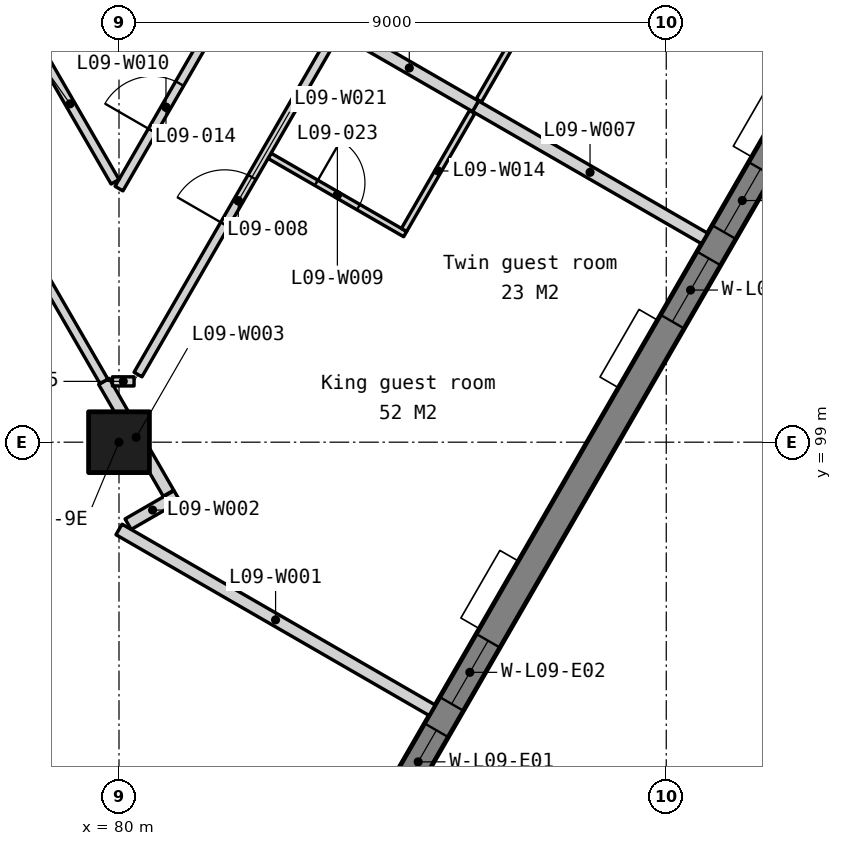
"""IFC4 building model, lengths in metres.
Left out: names, types, materials, properties, quantities, classifications, styles, units other than length and angle.
Written with IfcOpenShell. Run it as: python <this file> out.ifc"""

import sys

from ifc_helpers import new_model, si_unit, direction, frame, frame_2d, origin, origin_2d, place, context, subcontext, project, spatial, polyline, rectangle, outline, extrude, element, fill, save


model = new_model("IFC4")
c1 = context("Model", 3, precision=1e-05, world=origin(), true_north=direction((0.0, 1.0)))
c2 = subcontext(c1, "Body", "Model", "MODEL_VIEW")
j1 = project(units=[si_unit("LENGTHUNIT", "METRE"), si_unit("PLANEANGLEUNIT", "RADIAN")], contexts=[c1])
p1 = place(None, origin())
s1 = spatial("IfcSite", under=j1, at=p1, CompositionType="ELEMENT")
p2 = place(p1, origin())
s2 = spatial("IfcBuilding", under=s1, at=p2, CompositionType="ELEMENT")
p3 = place(p2, frame((0.0, 0.0, 45.5)))
s3 = spatial("IfcBuildingStorey", under=s2, at=p3, CompositionType="ELEMENT", Elevation=45.5)
p4 = place(p3, frame((80.0, 99.0, 0.0), z_axis=(0.0, 0.0, 1.0), x_axis=(1.0, 0.0, 0.0)))
e1 = element("IfcColumn", 1, at=p4, inside=s3, PredefinedType="COLUMN", context=c2, shape_type="SweptSolid", body=[
    extrude(rectangle(XDim=1.0, YDim=1.0, at=origin_2d()), origin(), (0.0, 0.0, 1.0), 3.5),
])
p5 = place(p3, frame((83.105, 90.599, -0.15), z_axis=(0.0, 0.0, 1.0), x_axis=(0.499999201451, 0.866025864826, 0.0)))
e2 = element("IfcWall", 2, at=p5, inside=s3, PredefinedType="SOLIDWALL", context=c2, shape_type="SweptSolid", body=[
    extrude(outline(polyline([(44.8, 0.0), (44.8, 3.5), (0.0, 3.5), (0.0, 0.0), (44.8, 0.0)])), frame((0.0, 0.225, 0.0), z_axis=(0.0, -1.0, 0.0), x_axis=(1.0, 0.0, 0.0)), (0.0, 0.0, 1.0), 0.45),
])
p6 = place(p5, frame((3.03, 0.0, 1.05)))
e3 = element("IfcOpeningElement", 3, at=p6, cuts=e2, PredefinedType="OPENING", context=c2, shape_type="SweptSolid", body=[
    extrude(rectangle(XDim=1.2, YDim=1.5, at=frame_2d((0.6, 0.75))), frame((0.0, 0.235, 0.0), z_axis=(0.0, -1.0, 0.0), x_axis=(1.0, 0.0, 0.0)), (0.0, 0.0, 1.0), 0.47),
])
p7 = place(p5, frame((4.73, 0.0, 1.05)))
e4 = element("IfcOpeningElement", 4, at=p7, cuts=e2, PredefinedType="OPENING", context=c2, shape_type="SweptSolid", body=[
    extrude(rectangle(XDim=1.2, YDim=1.5, at=frame_2d((0.6, 0.75))), frame((0.0, 0.235, 0.0), z_axis=(0.0, -1.0, 0.0), x_axis=(1.0, 0.0, 0.0)), (0.0, 0.0, 1.0), 0.47),
])
p8 = place(p5, frame((11.99, 0.0, 1.05)))
e5 = element("IfcOpeningElement", 5, at=p8, cuts=e2, PredefinedType="OPENING", context=c2, shape_type="SweptSolid", body=[
    extrude(rectangle(XDim=1.2, YDim=1.5, at=frame_2d((0.6, 0.75))), frame((0.0, 0.235, 0.0), z_axis=(0.0, -1.0, 0.0), x_axis=(1.0, 0.0, 0.0)), (0.0, 0.0, 1.0), 0.47),
])
p9 = place(p5, frame((13.69, 0.0, 1.05)))
e6 = element("IfcOpeningElement", 6, at=p9, cuts=e2, PredefinedType="OPENING", context=c2, shape_type="SweptSolid", body=[
    extrude(rectangle(XDim=1.2, YDim=1.5, at=frame_2d((0.6, 0.75))), frame((0.0, 0.235, 0.0), z_axis=(0.0, -1.0, 0.0), x_axis=(1.0, 0.0, 0.0)), (0.0, 0.0, 1.0), 0.47),
])
p10 = place(p5, frame((20.95, 0.0, 1.05)))
e7 = element("IfcOpeningElement", 7, at=p10, cuts=e2, PredefinedType="OPENING", context=c2, shape_type="SweptSolid", body=[
    extrude(rectangle(XDim=1.2, YDim=1.5, at=frame_2d((0.6, 0.75))), frame((0.0, 0.235, 0.0), z_axis=(0.0, -1.0, 0.0), x_axis=(1.0, 0.0, 0.0)), (0.0, 0.0, 1.0), 0.47),
])
p11 = place(p5, frame((22.65, 0.0, 1.05)))
e8 = element("IfcOpeningElement", 8, at=p11, cuts=e2, PredefinedType="OPENING", context=c2, shape_type="SweptSolid", body=[
    extrude(rectangle(XDim=1.2, YDim=1.5, at=frame_2d((0.6, 0.75))), frame((0.0, 0.235, 0.0), z_axis=(0.0, -1.0, 0.0), x_axis=(1.0, 0.0, 0.0)), (0.0, 0.0, 1.0), 0.47),
])
p12 = place(p5, frame((29.91, 0.0, 1.05)))
e9 = element("IfcOpeningElement", 9, at=p12, cuts=e2, PredefinedType="OPENING", context=c2, shape_type="SweptSolid", body=[
    extrude(rectangle(XDim=1.2, YDim=1.5, at=frame_2d((0.6, 0.75))), frame((0.0, 0.235, 0.0), z_axis=(0.0, -1.0, 0.0), x_axis=(1.0, 0.0, 0.0)), (0.0, 0.0, 1.0), 0.47),
])
p13 = place(p5, frame((31.61, 0.0, 1.05)))
e10 = element("IfcOpeningElement", 10, at=p13, cuts=e2, PredefinedType="OPENING", context=c2, shape_type="SweptSolid", body=[
    extrude(rectangle(XDim=1.2, YDim=1.5, at=frame_2d((0.6, 0.75))), frame((0.0, 0.235, 0.0), z_axis=(0.0, -1.0, 0.0), x_axis=(1.0, 0.0, 0.0)), (0.0, 0.0, 1.0), 0.47),
])
p14 = place(p5, frame((38.87, 0.0, 1.05)))
e11 = element("IfcOpeningElement", 11, at=p14, cuts=e2, PredefinedType="OPENING", context=c2, shape_type="SweptSolid", body=[
    extrude(rectangle(XDim=1.2, YDim=1.5, at=frame_2d((0.6, 0.75))), frame((0.0, 0.235, 0.0), z_axis=(0.0, -1.0, 0.0), x_axis=(1.0, 0.0, 0.0)), (0.0, 0.0, 1.0), 0.47),
])
p15 = place(p5, frame((40.57, 0.0, 1.05)))
e12 = element("IfcOpeningElement", 12, at=p15, cuts=e2, PredefinedType="OPENING", context=c2, shape_type="SweptSolid", body=[
    extrude(rectangle(XDim=1.2, YDim=1.5, at=frame_2d((0.6, 0.75))), frame((0.0, 0.235, 0.0), z_axis=(0.0, -1.0, 0.0), x_axis=(1.0, 0.0, 0.0)), (0.0, 0.0, 1.0), 0.47),
])
p16 = place(p3, frame((80.0, 97.565, 0.0), z_axis=(0.0, 0.0, 1.0), x_axis=(0.866021515814, -0.500006734102, 0.0)))
e13 = element("IfcWall", 13, at=p16, inside=s3, PredefinedType="PARTITIONING", context=c2, shape_type="SweptSolid", body=[
    extrude(rectangle(XDim=5.947, YDim=0.2, at=frame_2d((2.974, 0.0))), origin(), (0.0, 0.0, 1.0), 3.35),
])
p17 = place(p3, frame((80.15, 97.651, 0.0), z_axis=(0.0, 0.0, 1.0), x_axis=(0.866084982889, 0.499896791762, 0.0)))
e14 = element("IfcWall", 14, at=p17, inside=s3, PredefinedType="PARTITIONING", context=c2, shape_type="SweptSolid", body=[
    extrude(rectangle(XDim=0.929, YDim=0.2, at=frame_2d((0.465, 0.0))), origin(), (0.0, 0.0, 1.0), 3.35),
])
p18 = place(p3, frame((79.752, 100.0, 0.0), z_axis=(0.0, 0.0, 1.0), x_axis=(0.499861813449, -0.866105171129, 0.0)))
e15 = element("IfcWall", 15, at=p18, inside=s3, PredefinedType="PARTITIONING", context=c2, shape_type="SweptSolid", body=[
    extrude(rectangle(XDim=2.123, YDim=0.2, at=frame_2d((1.062, 0.0))), origin(), (0.0, 0.0, 1.0), 3.35),
])
p19 = place(p3, frame((76.389, 105.826, 0.0), z_axis=(0.0, 0.0, 1.0), x_axis=(0.499980071345, -0.866036909293, 0.0)))
e16 = element("IfcWall", 16, at=p19, inside=s3, PredefinedType="PARTITIONING", context=c2, shape_type="SweptSolid", body=[
    extrude(rectangle(XDim=6.727, YDim=0.15, at=frame_2d((3.363, 0.0))), origin(), (0.0, 0.0, 1.0), 3.35),
])
p20 = place(p19, frame((2.914, 0.0, 0.0)))
e17 = element("IfcOpeningElement", 17, at=p20, cuts=e16, PredefinedType="OPENING", context=c2, shape_type="SweptSolid", body=[
    extrude(rectangle(XDim=0.9, YDim=2.1, at=frame_2d((0.45, 1.05))), frame((0.0, 0.085, 0.0), z_axis=(0.0, -1.0, 0.0), x_axis=(1.0, 0.0, 0.0)), (0.0, 0.0, 1.0), 0.17),
])
p21 = place(p3, frame((79.892, 100.0, 0.0), z_axis=(0.0, 0.0, 1.0), x_axis=(1.0, 0.0, 0.0)))
e18 = element("IfcWall", 18, at=p21, inside=s3, PredefinedType="PARTITIONING", context=c2, shape_type="SweptSolid", body=[
    extrude(rectangle(XDim=0.355, YDim=0.15, at=frame_2d((0.178, 0.0))), origin(), (0.0, 0.0, 1.0), 3.35),
])
p22 = place(p3, frame((85.863, 104.526, 0.0), z_axis=(0.0, 0.0, 1.0), x_axis=(0.866027639635, -0.499996127374, 0.0)))
e19 = element("IfcWall", 19, at=p22, inside=s3, PredefinedType="PARTITIONING", context=c2, shape_type="SweptSolid", body=[
    extrude(rectangle(XDim=4.35, YDim=0.2, at=frame_2d((2.175, 0.0))), origin(), (0.0, 0.0, 1.0), 3.35),
])
p23 = place(p3, frame((82.476, 103.71, 0.0), z_axis=(0.0, 0.0, 1.0), x_axis=(0.866005588531, -0.500034319456, 0.0)))
e20 = element("IfcWall", 20, at=p23, inside=s3, PredefinedType="PARTITIONING", context=c2, shape_type="SweptSolid", body=[
    extrude(rectangle(XDim=2.575, YDim=0.1, at=frame_2d((1.288, 0.0))), origin(), (0.0, 0.0, 1.0), 3.35),
])
p24 = place(p23, frame((0.887, 0.0, 0.0)))
e21 = element("IfcOpeningElement", 21, at=p24, cuts=e20, PredefinedType="OPENING", context=c2, shape_type="SweptSolid", body=[
    extrude(rectangle(XDim=0.8, YDim=2.1, at=frame_2d((0.4, 1.05))), frame((0.0, 0.06, 0.0), z_axis=(0.0, -1.0, 0.0), x_axis=(1.0, 0.0, 0.0)), (0.0, 0.0, 1.0), 0.12),
])
p25 = place(p3, frame((80.0, 103.17, 0.0), z_axis=(0.0, 0.0, 1.0), x_axis=(0.499980071345, 0.866036909293, 0.0)))
e22 = element("IfcWall", 22, at=p25, inside=s3, PredefinedType="PARTITIONING", context=c2, shape_type="SweptSolid", body=[
    extrude(rectangle(XDim=3.09, YDim=0.15, at=frame_2d((1.545, 0.0))), origin(), (0.0, 0.0, 1.0), 3.35),
])
p26 = place(p25, frame((1.095, 0.0, 0.0)))
e23 = element("IfcOpeningElement", 23, at=p26, cuts=e22, PredefinedType="OPENING", context=c2, shape_type="SweptSolid", body=[
    extrude(rectangle(XDim=0.9, YDim=2.1, at=frame_2d((0.45, 1.05))), frame((0.0, 0.085, 0.0), z_axis=(0.0, -1.0, 0.0), x_axis=(1.0, 0.0, 0.0)), (0.0, 0.0, 1.0), 0.17),
])
p27 = place(p3, frame((84.688, 102.49, 0.0), z_axis=(0.0, 0.0, 1.0), x_axis=(0.500030632641, 0.866007717299, 0.0)))
e24 = element("IfcWall", 24, at=p27, inside=s3, PredefinedType="PARTITIONING", context=c2, shape_type="SweptSolid", body=[
    extrude(rectangle(XDim=2.24, YDim=0.1, at=frame_2d((1.12, 0.0))), origin(), (0.0, 0.0, 1.0), 3.35),
])
p28 = place(p3, frame((83.685, 105.783, 0.0), z_axis=(0.0, 0.0, 1.0), x_axis=(0.866006140796, -0.500033362991, 0.0)))
e25 = element("IfcWall", 25, at=p28, inside=s3, PredefinedType="PARTITIONING", context=c2, shape_type="SweptSolid", body=[
    extrude(rectangle(XDim=2.515, YDim=0.2, at=frame_2d((1.257, 0.0))), origin(), (0.0, 0.0, 1.0), 3.35),
])
p29 = place(p3, frame((80.313, 100.113, 0.0), z_axis=(0.0, 0.0, 1.0), x_axis=(0.500011833666, 0.866018571506, 0.0)))
e26 = element("IfcWall", 26, at=p29, inside=s3, PredefinedType="PARTITIONING", context=c2, shape_type="SweptSolid", body=[
    extrude(rectangle(XDim=6.597, YDim=0.15, at=frame_2d((3.298, 0.0))), origin(), (0.0, 0.0, 1.0), 3.35),
])
p30 = place(p29, frame((2.849, 0.0, 0.0)))
e27 = element("IfcOpeningElement", 27, at=p30, cuts=e26, PredefinedType="OPENING", context=c2, shape_type="SweptSolid", body=[
    extrude(rectangle(XDim=0.9, YDim=2.1, at=frame_2d((0.45, 1.05))), frame((0.0, 0.085, 0.0), z_axis=(0.0, -1.0, 0.0), x_axis=(1.0, 0.0, 0.0)), (0.0, 0.0, 1.0), 0.17),
])
p31 = place(p3, frame((78.455, 105.846, 0.0), z_axis=(0.0, 0.0, 1.0), x_axis=(0.499988999718, -0.866031754707, 0.0)))
e28 = element("IfcWall", 28, at=p31, inside=s3, PredefinedType="PARTITIONING", context=c2, shape_type="SweptSolid", body=[
    extrude(rectangle(XDim=2.96, YDim=0.15, at=frame_2d((1.48, 0.0))), origin(), (0.0, 0.0, 1.0), 3.35),
])
p32 = place(p3, frame((85.918, 104.621, 0.0), z_axis=(0.0, 0.0, 1.0), x_axis=(0.500032503492, 0.866006637072, 0.0)))
e29 = element("IfcWall", 29, at=p32, inside=s3, PredefinedType="PARTITIONING", context=c2, shape_type="SweptSolid", body=[
    extrude(rectangle(XDim=2.34, YDim=0.1, at=frame_2d((1.17, 0.0))), origin(), (0.0, 0.0, 1.0), 3.35),
])
p33 = place(p6, origin())
e30 = element("IfcWindow", 30, at=p33, inside=s3, PartitioningType="SINGLE_PANEL", PredefinedType="WINDOW", context=c2, shape_type="SweptSolid", body=[
    extrude(rectangle(XDim=1.2, YDim=1.5, at=frame_2d((0.6, 0.75))), frame((0.0, 0.03, 0.0), z_axis=(0.0, -1.0, 0.0), x_axis=(1.0, 0.0, 0.0)), (0.0, 0.0, 1.0), 0.06),
])
fill(e3, e30)
p34 = place(p7, origin())
e31 = element("IfcWindow", 31, at=p34, inside=s3, PartitioningType="SINGLE_PANEL", PredefinedType="WINDOW", context=c2, shape_type="SweptSolid", body=[
    extrude(rectangle(XDim=1.2, YDim=1.5, at=frame_2d((0.6, 0.75))), frame((0.0, 0.03, 0.0), z_axis=(0.0, -1.0, 0.0), x_axis=(1.0, 0.0, 0.0)), (0.0, 0.0, 1.0), 0.06),
])
fill(e4, e31)
p35 = place(p8, origin())
e32 = element("IfcWindow", 32, at=p35, inside=s3, PartitioningType="SINGLE_PANEL", PredefinedType="WINDOW", context=c2, shape_type="SweptSolid", body=[
    extrude(rectangle(XDim=1.2, YDim=1.5, at=frame_2d((0.6, 0.75))), frame((0.0, 0.03, 0.0), z_axis=(0.0, -1.0, 0.0), x_axis=(1.0, 0.0, 0.0)), (0.0, 0.0, 1.0), 0.06),
])
fill(e5, e32)
p36 = place(p9, origin())
e33 = element("IfcWindow", 33, at=p36, inside=s3, PartitioningType="SINGLE_PANEL", PredefinedType="WINDOW", context=c2, shape_type="SweptSolid", body=[
    extrude(rectangle(XDim=1.2, YDim=1.5, at=frame_2d((0.6, 0.75))), frame((0.0, 0.03, 0.0), z_axis=(0.0, -1.0, 0.0), x_axis=(1.0, 0.0, 0.0)), (0.0, 0.0, 1.0), 0.06),
])
fill(e6, e33)
p37 = place(p30, origin())
e34 = element("IfcDoor", 34, at=p37, inside=s3, OperationType="SINGLE_SWING_LEFT", PredefinedType="DOOR", context=c2, shape_type="SweptSolid", body=[
    extrude(rectangle(XDim=0.9, YDim=2.1, at=frame_2d((0.45, 1.05))), frame((0.0, 0.025, 0.0), z_axis=(0.0, -1.0, 0.0), x_axis=(1.0, 0.0, 0.0)), (0.0, 0.0, 1.0), 0.05),
])
fill(e27, e34)
p38 = place(p26, origin())
e35 = element("IfcDoor", 35, at=p38, inside=s3, OperationType="SINGLE_SWING_LEFT", PredefinedType="DOOR", context=c2, shape_type="SweptSolid", body=[
    extrude(rectangle(XDim=0.9, YDim=2.1, at=frame_2d((0.45, 1.05))), frame((0.0, 0.025, 0.0), z_axis=(0.0, -1.0, 0.0), x_axis=(1.0, 0.0, 0.0)), (0.0, 0.0, 1.0), 0.05),
])
fill(e23, e35)
p39 = place(p24, origin())
e36 = element("IfcDoor", 36, at=p39, inside=s3, OperationType="SINGLE_SWING_LEFT", PredefinedType="DOOR", context=c2, shape_type="SweptSolid", body=[
    extrude(rectangle(XDim=0.8, YDim=2.1, at=frame_2d((0.4, 1.05))), frame((0.0, 0.025, 0.0), z_axis=(0.0, -1.0, 0.0), x_axis=(1.0, 0.0, 0.0)), (0.0, 0.0, 1.0), 0.05),
])
fill(e21, e36)
save(model, sys.argv[1])
